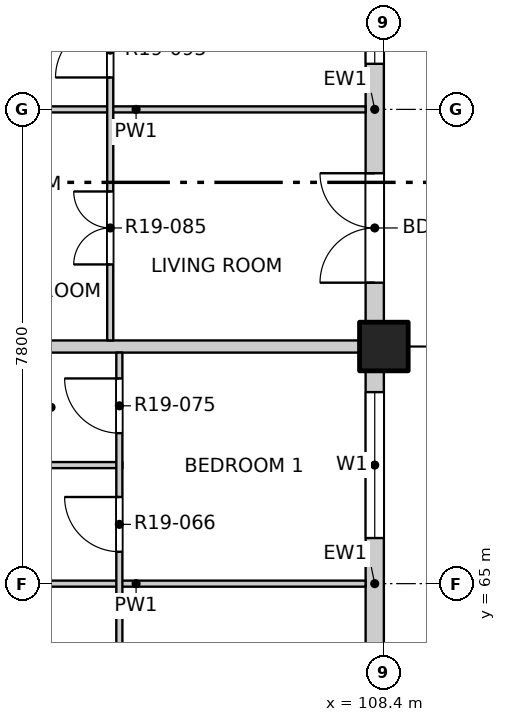
"""IFC4 building model, lengths in metres.
Left out: names, types, materials, properties, quantities, classifications, styles, units other than length and angle.
Written with IfcOpenShell. Run it as: python <this file> out.ifc"""

import sys

from ifc_helpers import new_model, si_unit, direction, frame, frame_2d, origin, origin_2d, place, context, subcontext, project, spatial, rectangle, extrude, element, fill, save


model = new_model("IFC4")
c1 = context("Model", 3, precision=1e-05, world=origin(), true_north=direction((0.0, 1.0)))
c2 = subcontext(c1, "Body", "Model", "MODEL_VIEW")
j1 = project(units=[si_unit("LENGTHUNIT", "METRE"), si_unit("PLANEANGLEUNIT", "RADIAN")], contexts=[c1])
p1 = place(None, origin())
s1 = spatial("IfcSite", under=j1, at=p1, CompositionType="ELEMENT")
p2 = place(p1, origin())
s2 = spatial("IfcBuilding", under=s1, at=p2, CompositionType="ELEMENT")
p3 = place(p2, frame((0.0, 0.0, 197.3)))
s3 = spatial("IfcBuildingStorey", under=s2, at=p3, CompositionType="ELEMENT", Elevation=197.3)
p4 = place(p3, frame((108.4, 68.9, -0.3), z_axis=(0.0, 0.0, 1.0), x_axis=(1.0, 0.0, 0.0)))
e1 = element("IfcColumn", 1, at=p4, inside=s3, PredefinedType="COLUMN", context=c2, shape_type="SweptSolid", body=[
    extrude(rectangle(XDim=0.8, YDim=0.8, at=origin_2d()), origin(), (0.0, 0.0, 1.0), 3.45),
])
p5 = place(p3, frame((108.25, 61.5, 0.0), z_axis=(0.0, 0.0, 1.0), x_axis=(0.0, 1.0, 0.0)))
e2 = element("IfcWall", 2, at=p5, inside=s3, PredefinedType="SOLIDWALL", context=c2, shape_type="SweptSolid", body=[
    extrude(rectangle(XDim=7.0, YDim=0.3, at=frame_2d((3.5, 0.0))), origin(), (0.0, 0.0, 1.0), 2.7),
])
p6 = place(p5, frame((0.65, 0.0, 0.0)))
e3 = element("IfcOpeningElement", 3, at=p6, cuts=e2, PredefinedType="OPENING", context=c2, shape_type="SweptSolid", body=[
    extrude(rectangle(XDim=1.8, YDim=2.4, at=frame_2d((0.9, 1.2))), frame((0.0, 0.16, 0.0), z_axis=(0.0, -1.0, 0.0), x_axis=(1.0, 0.0, 0.0)), (0.0, 0.0, 1.0), 0.32),
])
p7 = place(p5, frame((4.25, 0.0, 0.9)))
e4 = element("IfcOpeningElement", 4, at=p7, cuts=e2, PredefinedType="OPENING", context=c2, shape_type="SweptSolid", body=[
    extrude(rectangle(XDim=2.4, YDim=1.8, at=frame_2d((1.2, 0.9))), frame((0.0, 0.16, 0.0), z_axis=(0.0, -1.0, 0.0), x_axis=(1.0, 0.0, 0.0)), (0.0, 0.0, 1.0), 0.32),
])
p8 = place(p3, frame((108.25, 69.3, 0.0), z_axis=(0.0, 0.0, 1.0), x_axis=(0.0, 1.0, 0.0)))
e5 = element("IfcWall", 5, at=p8, inside=s3, PredefinedType="SOLIDWALL", context=c2, shape_type="SweptSolid", body=[
    extrude(rectangle(XDim=7.0, YDim=0.3, at=frame_2d((3.5, 0.0))), origin(), (0.0, 0.0, 1.0), 2.7),
])
p9 = place(p8, frame((0.65, 0.0, 0.0)))
e6 = element("IfcOpeningElement", 6, at=p9, cuts=e5, PredefinedType="OPENING", context=c2, shape_type="SweptSolid", body=[
    extrude(rectangle(XDim=1.8, YDim=2.4, at=frame_2d((0.9, 1.2))), frame((0.0, 0.16, 0.0), z_axis=(0.0, -1.0, 0.0), x_axis=(1.0, 0.0, 0.0)), (0.0, 0.0, 1.0), 0.32),
])
p10 = place(p8, frame((4.25, 0.0, 0.9)))
e7 = element("IfcOpeningElement", 7, at=p10, cuts=e5, PredefinedType="OPENING", context=c2, shape_type="SweptSolid", body=[
    extrude(rectangle(XDim=2.4, YDim=1.8, at=frame_2d((1.2, 0.9))), frame((0.0, 0.16, 0.0), z_axis=(0.0, -1.0, 0.0), x_axis=(1.0, 0.0, 0.0)), (0.0, 0.0, 1.0), 0.32),
])
p11 = place(p3, frame((100.55, 65.0, 0.0), z_axis=(0.0, 0.0, 1.0), x_axis=(1.0, 0.0, 0.0)))
e8 = element("IfcWall", 8, at=p11, inside=s3, PredefinedType="PARTITIONING", context=c2, shape_type="SweptSolid", body=[
    extrude(rectangle(XDim=7.55, YDim=0.1, at=frame_2d((3.775, 0.0))), origin(), (0.0, 0.0, 1.0), 3.15),
])
p12 = place(p3, frame((100.55, 66.95, 0.0), z_axis=(0.0, 0.0, 1.0), x_axis=(1.0, 0.0, 0.0)))
e9 = element("IfcWall", 9, at=p12, inside=s3, PredefinedType="PARTITIONING", context=c2, shape_type="SweptSolid", body=[
    extrude(rectangle(XDim=3.55, YDim=0.1, at=frame_2d((1.775, 0.0))), origin(), (0.0, 0.0, 1.0), 3.15),
])
p13 = place(p3, frame((96.6, 68.9, 0.0), z_axis=(0.0, 0.0, 1.0), x_axis=(1.0, 0.0, 0.0)))
e10 = element("IfcWall", 10, at=p13, inside=s3, PredefinedType="PARTITIONING", context=c2, shape_type="SweptSolid", body=[
    extrude(rectangle(XDim=11.5, YDim=0.2, at=frame_2d((5.75, 0.0))), origin(), (0.0, 0.0, 1.0), 2.55),
])
p14 = place(p3, frame((100.55, 72.8, 0.0), z_axis=(0.0, 0.0, 1.0), x_axis=(1.0, 0.0, 0.0)))
e11 = element("IfcWall", 11, at=p14, inside=s3, PredefinedType="PARTITIONING", context=c2, shape_type="SweptSolid", body=[
    extrude(rectangle(XDim=7.55, YDim=0.1, at=frame_2d((3.775, 0.0))), origin(), (0.0, 0.0, 1.0), 3.15),
])
p15 = place(p3, frame((103.9, 69.0, 0.0), z_axis=(0.0, 0.0, 1.0), x_axis=(0.0, 1.0, 0.0)))
e12 = element("IfcWall", 12, at=p15, inside=s3, PredefinedType="PARTITIONING", context=c2, shape_type="SweptSolid", body=[
    extrude(rectangle(XDim=19.1, YDim=0.1, at=frame_2d((9.55, 0.0))), origin(), (0.0, 0.0, 1.0), 3.15),
])
p16 = place(p15, frame((1.25, 0.0, 0.0)))
e13 = element("IfcOpeningElement", 13, at=p16, cuts=e12, PredefinedType="OPENING", context=c2, shape_type="SweptSolid", body=[
    extrude(rectangle(XDim=1.2, YDim=2.1, at=frame_2d((0.6, 1.05))), frame((0.0, 0.06, 0.0), z_axis=(0.0, -1.0, 0.0), x_axis=(1.0, 0.0, 0.0)), (0.0, 0.0, 1.0), 0.12),
])
p17 = place(p15, frame((4.325, 0.0, 0.0)))
e14 = element("IfcOpeningElement", 14, at=p17, cuts=e12, PredefinedType="OPENING", context=c2, shape_type="SweptSolid", body=[
    extrude(rectangle(XDim=0.9, YDim=2.1, at=frame_2d((0.45, 1.05))), frame((0.0, 0.06, 0.0), z_axis=(0.0, -1.0, 0.0), x_axis=(1.0, 0.0, 0.0)), (0.0, 0.0, 1.0), 0.12),
])
p18 = place(p15, frame((6.275, 0.0, 0.0)))
e15 = element("IfcOpeningElement", 15, at=p18, cuts=e12, PredefinedType="OPENING", context=c2, shape_type="SweptSolid", body=[
    extrude(rectangle(XDim=0.9, YDim=2.1, at=frame_2d((0.45, 1.05))), frame((0.0, 0.06, 0.0), z_axis=(0.0, -1.0, 0.0), x_axis=(1.0, 0.0, 0.0)), (0.0, 0.0, 1.0), 0.12),
])
p19 = place(p15, frame((8.225, 0.0, 0.0)))
e16 = element("IfcOpeningElement", 16, at=p19, cuts=e12, PredefinedType="OPENING", context=c2, shape_type="SweptSolid", body=[
    extrude(rectangle(XDim=0.9, YDim=2.1, at=frame_2d((0.45, 1.05))), frame((0.0, 0.06, 0.0), z_axis=(0.0, -1.0, 0.0), x_axis=(1.0, 0.0, 0.0)), (0.0, 0.0, 1.0), 0.12),
])
p20 = place(p15, frame((10.175, 0.0, 0.0)))
e17 = element("IfcOpeningElement", 17, at=p20, cuts=e12, PredefinedType="OPENING", context=c2, shape_type="SweptSolid", body=[
    extrude(rectangle(XDim=0.9, YDim=2.1, at=frame_2d((0.45, 1.05))), frame((0.0, 0.06, 0.0), z_axis=(0.0, -1.0, 0.0), x_axis=(1.0, 0.0, 0.0)), (0.0, 0.0, 1.0), 0.12),
])
p21 = place(p15, frame((12.125, 0.0, 0.0)))
e18 = element("IfcOpeningElement", 18, at=p21, cuts=e12, PredefinedType="OPENING", context=c2, shape_type="SweptSolid", body=[
    extrude(rectangle(XDim=0.9, YDim=2.1, at=frame_2d((0.45, 1.05))), frame((0.0, 0.06, 0.0), z_axis=(0.0, -1.0, 0.0), x_axis=(1.0, 0.0, 0.0)), (0.0, 0.0, 1.0), 0.12),
])
p22 = place(p15, frame((14.075, 0.0, 0.0)))
e19 = element("IfcOpeningElement", 19, at=p22, cuts=e12, PredefinedType="OPENING", context=c2, shape_type="SweptSolid", body=[
    extrude(rectangle(XDim=0.9, YDim=2.1, at=frame_2d((0.45, 1.05))), frame((0.0, 0.06, 0.0), z_axis=(0.0, -1.0, 0.0), x_axis=(1.0, 0.0, 0.0)), (0.0, 0.0, 1.0), 0.12),
])
p23 = place(p15, frame((16.85, 0.0, 0.0)))
e20 = element("IfcOpeningElement", 20, at=p23, cuts=e12, PredefinedType="OPENING", context=c2, shape_type="SweptSolid", body=[
    extrude(rectangle(XDim=1.2, YDim=2.1, at=frame_2d((0.6, 1.05))), frame((0.0, 0.06, 0.0), z_axis=(0.0, -1.0, 0.0), x_axis=(1.0, 0.0, 0.0)), (0.0, 0.0, 1.0), 0.12),
])
p24 = place(p3, frame((104.05, 41.9, 0.0), z_axis=(0.0, 0.0, 1.0), x_axis=(0.0, 1.0, 0.0)))
e21 = element("IfcWall", 21, at=p24, inside=s3, PredefinedType="PARTITIONING", context=c2, shape_type="SweptSolid", body=[
    extrude(rectangle(XDim=26.9, YDim=0.1, at=frame_2d((13.45, 0.0))), origin(), (0.0, 0.0, 1.0), 3.15),
])
p25 = place(p24, frame((1.05, 0.0, 0.0)))
e22 = element("IfcOpeningElement", 22, at=p25, cuts=e21, PredefinedType="OPENING", context=c2, shape_type="SweptSolid", body=[
    extrude(rectangle(XDim=1.2, YDim=2.1, at=frame_2d((0.6, 1.05))), frame((0.0, 0.06, 0.0), z_axis=(0.0, -1.0, 0.0), x_axis=(1.0, 0.0, 0.0)), (0.0, 0.0, 1.0), 0.12),
])
p26 = place(p24, frame((4.95, 0.0, 0.0)))
e23 = element("IfcOpeningElement", 23, at=p26, cuts=e21, PredefinedType="OPENING", context=c2, shape_type="SweptSolid", body=[
    extrude(rectangle(XDim=1.2, YDim=2.1, at=frame_2d((0.6, 1.05))), frame((0.0, 0.06, 0.0), z_axis=(0.0, -1.0, 0.0), x_axis=(1.0, 0.0, 0.0)), (0.0, 0.0, 1.0), 0.12),
])
p27 = place(p24, frame((8.025, 0.0, 0.0)))
e24 = element("IfcOpeningElement", 24, at=p27, cuts=e21, PredefinedType="OPENING", context=c2, shape_type="SweptSolid", body=[
    extrude(rectangle(XDim=0.9, YDim=2.1, at=frame_2d((0.45, 1.05))), frame((0.0, 0.06, 0.0), z_axis=(0.0, -1.0, 0.0), x_axis=(1.0, 0.0, 0.0)), (0.0, 0.0, 1.0), 0.12),
])
p28 = place(p24, frame((9.975, 0.0, 0.0)))
e25 = element("IfcOpeningElement", 25, at=p28, cuts=e21, PredefinedType="OPENING", context=c2, shape_type="SweptSolid", body=[
    extrude(rectangle(XDim=0.9, YDim=2.1, at=frame_2d((0.45, 1.05))), frame((0.0, 0.06, 0.0), z_axis=(0.0, -1.0, 0.0), x_axis=(1.0, 0.0, 0.0)), (0.0, 0.0, 1.0), 0.12),
])
p29 = place(p24, frame((12.75, 0.0, 0.0)))
e26 = element("IfcOpeningElement", 26, at=p29, cuts=e21, PredefinedType="OPENING", context=c2, shape_type="SweptSolid", body=[
    extrude(rectangle(XDim=1.2, YDim=2.1, at=frame_2d((0.6, 1.05))), frame((0.0, 0.06, 0.0), z_axis=(0.0, -1.0, 0.0), x_axis=(1.0, 0.0, 0.0)), (0.0, 0.0, 1.0), 0.12),
])
p30 = place(p24, frame((15.825, 0.0, 0.0)))
e27 = element("IfcOpeningElement", 27, at=p30, cuts=e21, PredefinedType="OPENING", context=c2, shape_type="SweptSolid", body=[
    extrude(rectangle(XDim=0.9, YDim=2.1, at=frame_2d((0.45, 1.05))), frame((0.0, 0.06, 0.0), z_axis=(0.0, -1.0, 0.0), x_axis=(1.0, 0.0, 0.0)), (0.0, 0.0, 1.0), 0.12),
])
p31 = place(p24, frame((17.775, 0.0, 0.0)))
e28 = element("IfcOpeningElement", 28, at=p31, cuts=e21, PredefinedType="OPENING", context=c2, shape_type="SweptSolid", body=[
    extrude(rectangle(XDim=0.9, YDim=2.1, at=frame_2d((0.45, 1.05))), frame((0.0, 0.06, 0.0), z_axis=(0.0, -1.0, 0.0), x_axis=(1.0, 0.0, 0.0)), (0.0, 0.0, 1.0), 0.12),
])
p32 = place(p24, frame((20.55, 0.0, 0.0)))
e29 = element("IfcOpeningElement", 29, at=p32, cuts=e21, PredefinedType="OPENING", context=c2, shape_type="SweptSolid", body=[
    extrude(rectangle(XDim=1.2, YDim=2.1, at=frame_2d((0.6, 1.05))), frame((0.0, 0.06, 0.0), z_axis=(0.0, -1.0, 0.0), x_axis=(1.0, 0.0, 0.0)), (0.0, 0.0, 1.0), 0.12),
])
p33 = place(p24, frame((23.625, 0.0, 0.0)))
e30 = element("IfcOpeningElement", 30, at=p33, cuts=e21, PredefinedType="OPENING", context=c2, shape_type="SweptSolid", body=[
    extrude(rectangle(XDim=0.9, YDim=2.1, at=frame_2d((0.45, 1.05))), frame((0.0, 0.06, 0.0), z_axis=(0.0, -1.0, 0.0), x_axis=(1.0, 0.0, 0.0)), (0.0, 0.0, 1.0), 0.12),
])
p34 = place(p24, frame((25.575, 0.0, 0.0)))
e31 = element("IfcOpeningElement", 31, at=p34, cuts=e21, PredefinedType="OPENING", context=c2, shape_type="SweptSolid", body=[
    extrude(rectangle(XDim=0.9, YDim=2.1, at=frame_2d((0.45, 1.05))), frame((0.0, 0.06, 0.0), z_axis=(0.0, -1.0, 0.0), x_axis=(1.0, 0.0, 0.0)), (0.0, 0.0, 1.0), 0.12),
])
p35 = place(p7, origin())
e32 = element("IfcWindow", 32, at=p35, inside=s3, PartitioningType="DOUBLE_PANEL_VERTICAL", PredefinedType="WINDOW", context=c2, shape_type="SweptSolid", body=[
    extrude(rectangle(XDim=2.4, YDim=1.8, at=frame_2d((1.2, 0.9))), frame((0.0, 0.03, 0.0), z_axis=(0.0, -1.0, 0.0), x_axis=(1.0, 0.0, 0.0)), (0.0, 0.0, 1.0), 0.06),
])
fill(e4, e32)
p36 = place(p9, origin())
e33 = element("IfcDoor", 33, at=p36, inside=s3, OperationType="DOUBLE_DOOR_SINGLE_SWING", PredefinedType="DOOR", context=c2, shape_type="SweptSolid", body=[
    extrude(rectangle(XDim=1.8, YDim=2.4, at=frame_2d((0.9, 1.2))), frame((0.0, 0.025, 0.0), z_axis=(0.0, -1.0, 0.0), x_axis=(1.0, 0.0, 0.0)), (0.0, 0.0, 1.0), 0.05),
])
fill(e6, e33)
p37 = place(p10, origin())
e34 = element("IfcWindow", 34, at=p37, inside=s3, PartitioningType="DOUBLE_PANEL_VERTICAL", PredefinedType="WINDOW", context=c2, shape_type="SweptSolid", body=[
    extrude(rectangle(XDim=2.4, YDim=1.8, at=frame_2d((1.2, 0.9))), frame((0.0, 0.03, 0.0), z_axis=(0.0, -1.0, 0.0), x_axis=(1.0, 0.0, 0.0)), (0.0, 0.0, 1.0), 0.06),
])
fill(e7, e34)
p38 = place(p33, origin())
e35 = element("IfcDoor", 35, at=p38, inside=s3, OperationType="SINGLE_SWING_RIGHT", PredefinedType="DOOR", context=c2, shape_type="SweptSolid", body=[
    extrude(rectangle(XDim=0.9, YDim=2.1, at=frame_2d((0.45, 1.05))), frame((0.0, 0.025, 0.0), z_axis=(0.0, -1.0, 0.0), x_axis=(1.0, 0.0, 0.0)), (0.0, 0.0, 1.0), 0.05),
])
fill(e30, e35)
p39 = place(p34, origin())
e36 = element("IfcDoor", 36, at=p39, inside=s3, OperationType="SINGLE_SWING_RIGHT", PredefinedType="DOOR", context=c2, shape_type="SweptSolid", body=[
    extrude(rectangle(XDim=0.9, YDim=2.1, at=frame_2d((0.45, 1.05))), frame((0.0, 0.025, 0.0), z_axis=(0.0, -1.0, 0.0), x_axis=(1.0, 0.0, 0.0)), (0.0, 0.0, 1.0), 0.05),
])
fill(e31, e36)
p40 = place(p16, origin())
e37 = element("IfcDoor", 37, at=p40, inside=s3, OperationType="DOUBLE_DOOR_SINGLE_SWING", PredefinedType="DOOR", context=c2, shape_type="SweptSolid", body=[
    extrude(rectangle(XDim=1.2, YDim=2.1, at=frame_2d((0.6, 1.05))), frame((0.0, 0.025, 0.0), z_axis=(0.0, -1.0, 0.0), x_axis=(1.0, 0.0, 0.0)), (0.0, 0.0, 1.0), 0.05),
])
fill(e13, e37)
p41 = place(p17, origin())
e38 = element("IfcDoor", 38, at=p41, inside=s3, OperationType="SINGLE_SWING_LEFT", PredefinedType="DOOR", context=c2, shape_type="SweptSolid", body=[
    extrude(rectangle(XDim=0.9, YDim=2.1, at=frame_2d((0.45, 1.05))), frame((0.0, 0.025, 0.0), z_axis=(0.0, -1.0, 0.0), x_axis=(1.0, 0.0, 0.0)), (0.0, 0.0, 1.0), 0.05),
])
fill(e14, e38)
save(model, sys.argv[1])
